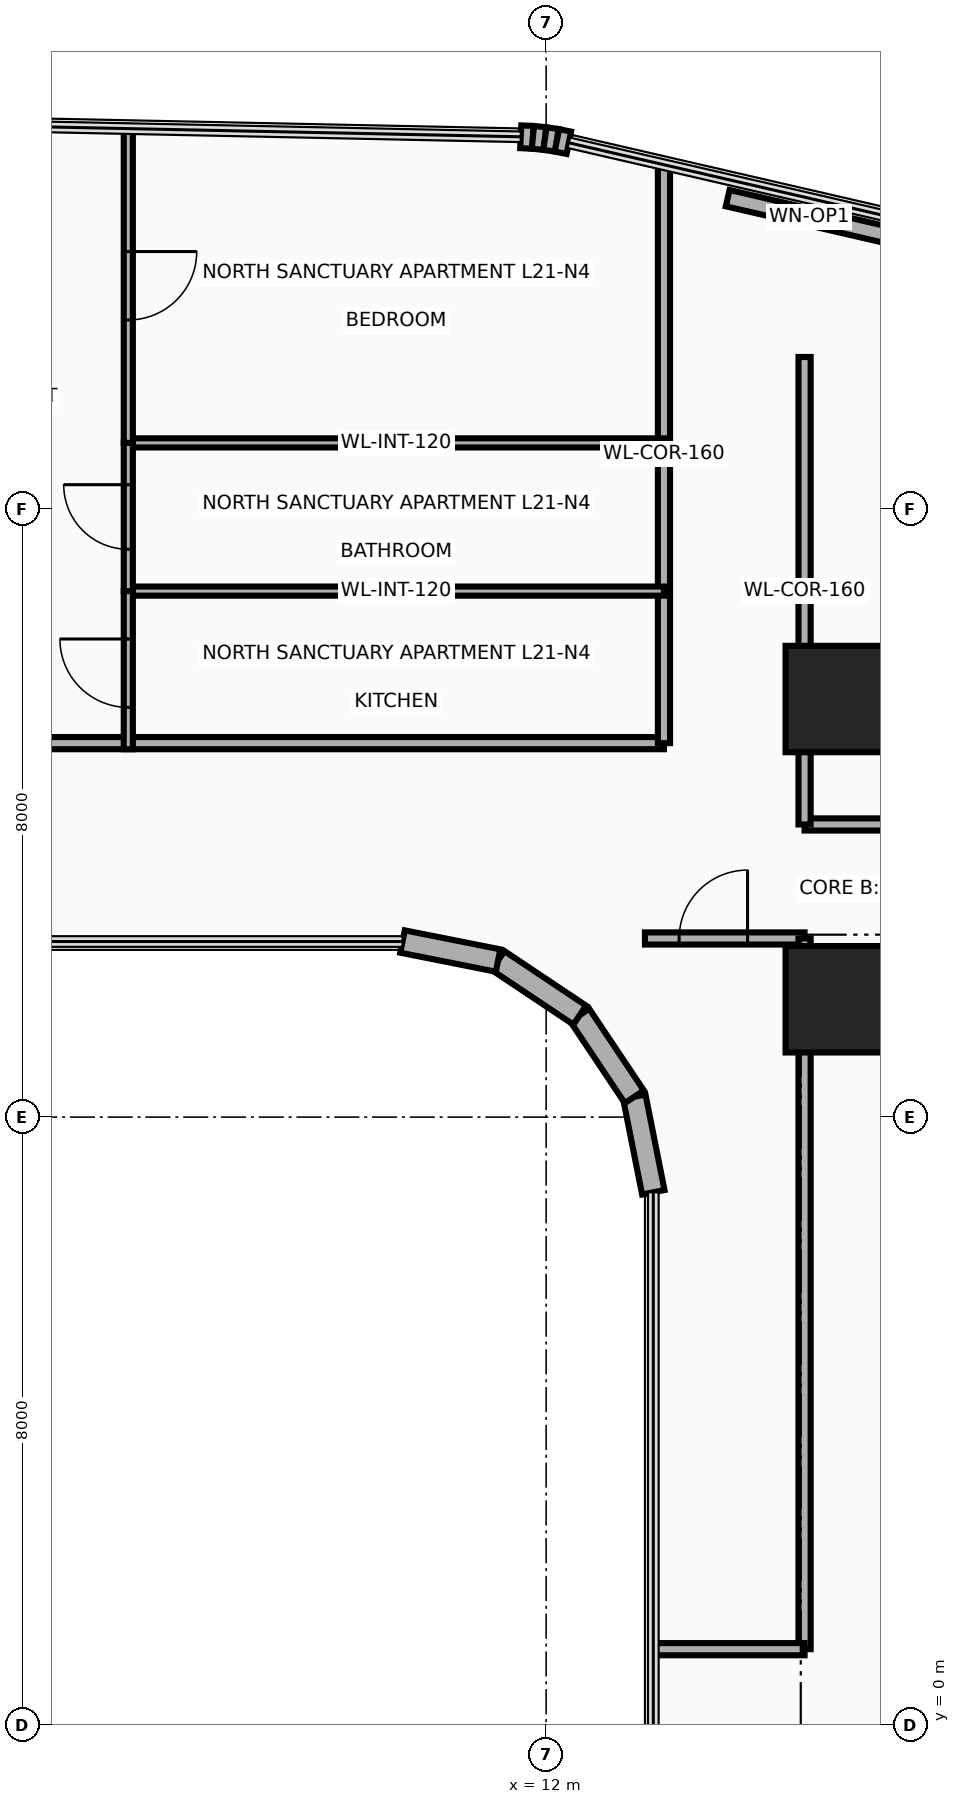
"""IFC4 building model, lengths in metres.
Left out: names, types, materials, properties, quantities, classifications, styles, units other than length and angle.
Written with IfcOpenShell. Run it as: python <this file> out.ifc"""

import sys

from ifc_helpers import new_model, si_unit, direction, frame, frame_2d, origin, origin_2d, place, context, subcontext, project, spatial, rectangle, extrude, source, transform, mapped, element, fill, save


model = new_model("IFC4")
c1 = context("Model", 3, precision=1e-05, world=origin(), true_north=direction((0.0, 1.0)))
c2 = subcontext(c1, "Body", "Model", "MODEL_VIEW")
j1 = project(units=[si_unit("LENGTHUNIT", "METRE"), si_unit("PLANEANGLEUNIT", "RADIAN")], contexts=[c1])
p1 = place(None, origin())
s1 = spatial("IfcSite", under=j1, at=p1, CompositionType="ELEMENT")
p2 = place(p1, origin())
s2 = spatial("IfcBuilding", under=s1, at=p2, CompositionType="ELEMENT")
p3 = place(p2, frame((0.0, 0.0, 85.2)))
s3 = spatial("IfcBuildingStorey", under=s2, at=p3, CompositionType="ELEMENT", Elevation=85.2)
p4 = place(p3, frame((15.85, 9.55, 0.0), z_axis=(0.0, 0.0, 1.0), x_axis=(1.0, 0.0, 0.0)))
e1 = element("IfcWall", 1, at=p4, inside=s3, PredefinedType="SHEAR", context=c2, shape_type="SweptSolid", body=[
    extrude(rectangle(XDim=9.0, YDim=0.7, at=frame_2d((4.5, 0.0))), origin(), (0.0, 0.0, 1.0), 3.46),
])
m1 = source(origin(), c2, "Body", "SweptSolid", [
    extrude(rectangle(XDim=1.4, YDim=1.4, at=origin_2d()), origin(), (0.0, 0.0, 1.0), 3.7),
])
for number, where, z_axis, x_axis in (
    (2, (15.85, 9.55, 0.0), (0.0, 0.0, 1.0), (1.0, 0.0, 0.0)),
    (3, (15.85, 13.5, 0.0), (0.0, 0.0, 1.0), (1.0, 0.0, 0.0)),
):
    element("IfcColumn", number, at=place(p3, frame(where, z_axis=z_axis, x_axis=x_axis)), inside=s3, PredefinedType="COLUMN", context=c2, shape_type="MappedRepresentation", body=[
        mapped(m1, transform((0.0, 0.0, 0.0), x_axis=(1.0, 0.0, 0.0), y_axis=(0.0, 1.0, 0.0), z_axis=(0.0, 0.0, 1.0), scale=1.0)),
    ])
p5 = place(p3, frame((11.666, 20.897, 0.0), z_axis=(0.0, 0.0, 1.0), x_axis=(0.998885297239, -0.047203421059, 0.0)))
e4 = element("IfcWall", 4, at=p5, inside=s3, PredefinedType="SOLIDWALL", context=c2, shape_type="SweptSolid", body=[
    extrude(rectangle(XDim=0.16, YDim=0.3, at=frame_2d((0.08, 0.0))), origin(), (0.0, 0.0, 1.0), 3.46),
])
p6 = place(p3, frame((11.826, 20.889, 0.0), z_axis=(0.0, 0.0, 1.0), x_axis=(0.995172891136, -0.098137234257, 0.0)))
e5 = element("IfcWall", 5, at=p6, inside=s3, PredefinedType="SOLIDWALL", context=c2, shape_type="SweptSolid", body=[
    extrude(rectangle(XDim=0.159, YDim=0.3, at=frame_2d((0.08, 0.0))), origin(), (0.0, 0.0, 1.0), 3.46),
])
p7 = place(p3, frame((11.984, 20.874, 0.0), z_axis=(0.0, 0.0, 1.0), x_axis=(0.988846069207, -0.148941100486, 0.0)))
e6 = element("IfcWall", 6, at=p7, inside=s3, PredefinedType="SOLIDWALL", context=c2, shape_type="SweptSolid", body=[
    extrude(rectangle(XDim=0.159, YDim=0.3, at=frame_2d((0.08, 0.0))), origin(), (0.0, 0.0, 1.0), 3.46),
])
p8 = place(p3, frame((12.142, 20.85, 0.0), z_axis=(0.0, 0.0, 1.0), x_axis=(0.979991950448, -0.19903712482, 0.0)))
e7 = element("IfcWall", 7, at=p8, inside=s3, PredefinedType="SOLIDWALL", context=c2, shape_type="SweptSolid", body=[
    extrude(rectangle(XDim=0.161, YDim=0.3, at=frame_2d((0.08, 0.0))), origin(), (0.0, 0.0, 1.0), 3.46),
])
p9 = place(p3, frame((14.389, 20.09, 0.0), z_axis=(0.0, 0.0, 1.0), x_axis=(0.974400545997, -0.224818984875, 0.0)))
e8 = element("IfcWall", 8, at=p9, inside=s3, PredefinedType="SOLIDWALL", context=c2, shape_type="SweptSolid", body=[
    extrude(rectangle(XDim=2.2, YDim=0.22, at=frame_2d((1.1, 0.0))), origin(), (0.0, 0.0, 1.0), 3.46),
])
p10 = place(p9, frame((0.65, 0.0, 0.95)))
e9 = element("IfcOpeningElement", 9, at=p10, cuts=e8, PredefinedType="OPENING", context=c2, shape_type="SweptSolid", body=[
    extrude(rectangle(XDim=0.9, YDim=1.3, at=frame_2d((0.45, 0.65))), frame((0.0, 0.125, 0.0), z_axis=(0.0, -1.0, 0.0), x_axis=(1.0, 0.0, 0.0)), (0.0, 0.0, 1.0), 0.25),
])
p11 = place(p3, frame((13.41, 7.011, 0.0), z_axis=(0.0, 0.0, 1.0), x_axis=(-0.195090163074, 0.980785312019, 0.0)))
e10 = element("IfcWall", 10, at=p11, inside=s3, PredefinedType="SOLIDWALL", context=c2, shape_type="SweptSolid", body=[
    extrude(rectangle(XDim=1.281, YDim=0.3, at=frame_2d((0.641, 0.0))), origin(), (0.0, 0.0, 1.0), 3.46),
])
for number, where, z_axis, x_axis in (
    (11, (13.16, 8.268, 0.0), (0.0, 0.0, 1.0), (-0.556, 0.831, 0.0)),
    (12, (12.442, 9.342, 0.0), (0.0, 0.0, 1.0), (-0.831, 0.556, 0.0)),
):
    element("IfcWall", number, at=place(p3, frame(where, z_axis=z_axis, x_axis=x_axis)), inside=s3, PredefinedType="SOLIDWALL", context=c2, shape_type="SweptSolid", body=[
        extrude(rectangle(XDim=1.292, YDim=0.3, at=frame_2d((0.646, 0.0))), origin(), (0.0, 0.0, 1.0), 3.46),
    ])
p12 = place(p3, frame((11.367, 10.06, 0.0), z_axis=(0.0, 0.0, 1.0), x_axis=(-0.980778058848, 0.195126623715, 0.0)))
e13 = element("IfcWall", 13, at=p12, inside=s3, PredefinedType="SOLIDWALL", context=c2, shape_type="SweptSolid", body=[
    extrude(rectangle(XDim=1.281, YDim=0.3, at=frame_2d((0.641, 0.0))), origin(), (0.0, 0.0, 1.0), 3.46),
])
p13 = place(p3, frame((-33.54, 12.92, 0.0), z_axis=(0.0, 0.0, 1.0), x_axis=(1.0, 0.0, 0.0)))
e14 = element("IfcWall", 14, at=p13, inside=s3, PredefinedType="PARTITIONING", context=c2, shape_type="SweptSolid", body=[
    extrude(rectangle(XDim=47.09, YDim=0.16, at=frame_2d((23.545, 0.0))), origin(), (0.0, 0.0, 1.0), 2.583),
])
p14 = place(p13, frame((4.48, 0.0, 0.0)))
e15 = element("IfcOpeningElement", 15, at=p14, cuts=e14, PredefinedType="OPENING", context=c2, shape_type="SweptSolid", body=[
    extrude(rectangle(XDim=1.8, YDim=2.15, at=frame_2d((0.9, 1.075))), frame((0.0, 0.095, 0.0), z_axis=(0.0, -1.0, 0.0), x_axis=(1.0, 0.0, 0.0)), (0.0, 0.0, 1.0), 0.19),
])
p15 = place(p13, frame((15.355, 0.0, 0.0)))
e16 = element("IfcOpeningElement", 16, at=p15, cuts=e14, PredefinedType="OPENING", context=c2, shape_type="SweptSolid", body=[
    extrude(rectangle(XDim=0.9, YDim=2.1, at=frame_2d((0.45, 1.05))), frame((0.0, 0.095, 0.0), z_axis=(0.0, -1.0, 0.0), x_axis=(1.0, 0.0, 0.0)), (0.0, 0.0, 1.0), 0.19),
])
p16 = place(p13, frame((23.632, 0.0, 0.0)))
e17 = element("IfcOpeningElement", 17, at=p16, cuts=e14, PredefinedType="OPENING", context=c2, shape_type="SweptSolid", body=[
    extrude(rectangle(XDim=0.95, YDim=2.15, at=frame_2d((0.475, 1.075))), frame((0.0, 0.095, 0.0), z_axis=(0.0, -1.0, 0.0), x_axis=(1.0, 0.0, 0.0)), (0.0, 0.0, 1.0), 0.19),
])
p17 = place(p13, frame((36.28, 0.0, 0.0)))
e18 = element("IfcOpeningElement", 18, at=p17, cuts=e14, PredefinedType="OPENING", context=c2, shape_type="SweptSolid", body=[
    extrude(rectangle(XDim=0.95, YDim=2.15, at=frame_2d((0.475, 1.075))), frame((0.0, 0.095, 0.0), z_axis=(0.0, -1.0, 0.0), x_axis=(1.0, 0.0, 0.0)), (0.0, 0.0, 1.0), 0.19),
])
p18 = place(p3, frame((13.55, 12.92, 0.0), z_axis=(0.0, 0.0, 1.0), x_axis=(0.0, 1.0, 0.0)))
e19 = element("IfcWall", 19, at=p18, inside=s3, PredefinedType="PARTITIONING", context=c2, shape_type="SweptSolid", body=[
    extrude(rectangle(XDim=7.609, YDim=0.16, at=frame_2d((3.805, 0.0))), origin(), (0.0, 0.0, 1.0), 2.583),
])
for number, where, z_axis, x_axis in (
    (20, (6.503, 14.92, 0.0), (0.0, 0.0, 1.0), (1.0, 0.0, 0.0)),
    (21, (6.503, 16.87, 0.0), (0.0, 0.0, 1.0), (1.0, 0.0, 0.0)),
):
    element("IfcWall", number, at=place(p3, frame(where, z_axis=z_axis, x_axis=x_axis)), inside=s3, PredefinedType="PARTITIONING", context=c2, shape_type="SweptSolid", body=[
        extrude(rectangle(XDim=7.047, YDim=0.12, at=frame_2d((3.523, 0.0))), origin(), (0.0, 0.0, 1.0), 3.46),
    ])
p19 = place(p3, frame((6.503, 14.92, 0.0), z_axis=(0.0, 0.0, 1.0), x_axis=(0.0, 1.0, 0.0)))
e22 = element("IfcWall", 22, at=p19, inside=s3, PredefinedType="PARTITIONING", context=c2, shape_type="SweptSolid", body=[
    extrude(rectangle(XDim=1.95, YDim=0.12, at=frame_2d((0.975, 0.0))), origin(), (0.0, 0.0, 1.0), 3.46),
])
p20 = place(p19, frame((0.55, 0.0, 0.0)))
e23 = element("IfcOpeningElement", 23, at=p20, cuts=e22, PredefinedType="OPENING", context=c2, shape_type="SweptSolid", body=[
    extrude(rectangle(XDim=0.85, YDim=2.1, at=frame_2d((0.425, 1.05))), frame((0.0, 0.075, 0.0), z_axis=(0.0, -1.0, 0.0), x_axis=(1.0, 0.0, 0.0)), (0.0, 0.0, 1.0), 0.15),
])
p21 = place(p3, frame((6.503, 12.84, 0.0), z_axis=(0.0, 0.0, 1.0), x_axis=(0.0, 1.0, 0.0)))
e24 = element("IfcWall", 24, at=p21, inside=s3, PredefinedType="PARTITIONING", context=c2, shape_type="SweptSolid", body=[
    extrude(rectangle(XDim=2.08, YDim=0.12, at=frame_2d((1.04, 0.0))), origin(), (0.0, 0.0, 1.0), 2.583),
])
p22 = place(p21, frame((0.55, 0.0, 0.0)))
e25 = element("IfcOpeningElement", 25, at=p22, cuts=e24, PredefinedType="OPENING", context=c2, shape_type="SweptSolid", body=[
    extrude(rectangle(XDim=0.9, YDim=2.1, at=frame_2d((0.45, 1.05))), frame((0.0, 0.075, 0.0), z_axis=(0.0, -1.0, 0.0), x_axis=(1.0, 0.0, 0.0)), (0.0, 0.0, 1.0), 0.15),
])
p23 = place(p3, frame((6.503, 16.87, 0.0), z_axis=(0.0, 0.0, 1.0), x_axis=(0.0, 1.0, 0.0)))
e26 = element("IfcWall", 26, at=p23, inside=s3, PredefinedType="PARTITIONING", context=c2, shape_type="SweptSolid", body=[
    extrude(rectangle(XDim=4.134, YDim=0.12, at=frame_2d((2.067, 0.0))), origin(), (0.0, 0.0, 1.0), 3.46),
])
p24 = place(p23, frame((1.617, 0.0, 0.0)))
e27 = element("IfcOpeningElement", 27, at=p24, cuts=e26, PredefinedType="OPENING", context=c2, shape_type="SweptSolid", body=[
    extrude(rectangle(XDim=0.9, YDim=2.1, at=frame_2d((0.45, 1.05))), frame((0.0, 0.075, 0.0), z_axis=(0.0, -1.0, 0.0), x_axis=(1.0, 0.0, 0.0)), (0.0, 0.0, 1.0), 0.15),
])
p25 = place(p3, frame((15.4, 11.85, 0.0), z_axis=(0.0, 0.0, 1.0), x_axis=(1.0, 0.0, 0.0)))
e28 = element("IfcWall", 28, at=p25, inside=s3, PredefinedType="PARTITIONING", context=c2, shape_type="SweptSolid", body=[
    extrude(rectangle(XDim=10.2, YDim=0.16, at=frame_2d((5.1, 0.0))), origin(), (0.0, 0.0, 1.0), 2.834),
])
p26 = place(p25, frame((4.65, 0.0, 0.0)))
e29 = element("IfcOpeningElement", 29, at=p26, cuts=e28, PredefinedType="OPENING", context=c2, shape_type="SweptSolid", body=[
    extrude(rectangle(XDim=0.9, YDim=2.1, at=frame_2d((0.45, 1.05))), frame((0.0, 0.095, 0.0), z_axis=(0.0, -1.0, 0.0), x_axis=(1.0, 0.0, 0.0)), (0.0, 0.0, 1.0), 0.19),
])
p27 = place(p3, frame((15.4, 11.85, 0.0), z_axis=(0.0, 0.0, 1.0), x_axis=(0.0, 1.0, 0.0)))
e30 = element("IfcWall", 30, at=p27, inside=s3, PredefinedType="PARTITIONING", context=c2, shape_type="SweptSolid", body=[
    extrude(rectangle(XDim=6.15, YDim=0.16, at=frame_2d((3.075, 0.0))), origin(), (0.0, 0.0, 1.0), 2.583),
])
p28 = place(p3, frame((13.3, 10.35, 0.0), z_axis=(0.0, 0.0, 1.0), x_axis=(1.0, 0.0, 0.0)))
e31 = element("IfcWall", 31, at=p28, inside=s3, PredefinedType="PARTITIONING", context=c2, shape_type="SweptSolid", body=[
    extrude(rectangle(XDim=2.1, YDim=0.16, at=frame_2d((1.05, 0.0))), origin(), (0.0, 0.0, 1.0), 2.583),
])
p29 = place(p28, frame((0.45, 0.0, 0.0)))
e32 = element("IfcOpeningElement", 32, at=p29, cuts=e31, PredefinedType="OPENING", context=c2, shape_type="SweptSolid", body=[
    extrude(rectangle(XDim=0.9, YDim=2.1, at=frame_2d((0.45, 1.05))), frame((0.0, 0.095, 0.0), z_axis=(0.0, -1.0, 0.0), x_axis=(1.0, 0.0, 0.0)), (0.0, 0.0, 1.0), 0.19),
])
p30 = place(p3, frame((15.4, 1.0, 0.0), z_axis=(0.0, 0.0, 1.0), x_axis=(0.0, 1.0, 0.0)))
e33 = element("IfcWall", 33, at=p30, inside=s3, PredefinedType="PARTITIONING", context=c2, shape_type="SweptSolid", body=[
    extrude(rectangle(XDim=9.35, YDim=0.16, at=frame_2d((4.675, 0.0))), origin(), (0.0, 0.0, 1.0), 2.245),
])
p31 = place(p3, frame((13.41, 1.0, 0.0), z_axis=(0.0, 0.0, 1.0), x_axis=(1.0, 0.0, 0.0)))
e34 = element("IfcWall", 34, at=p31, inside=s3, PredefinedType="PARTITIONING", context=c2, shape_type="SweptSolid", body=[
    extrude(rectangle(XDim=1.99, YDim=0.16, at=frame_2d((0.995, 0.0))), origin(), (0.0, 0.0, 1.0), 2.245),
])
p32 = place(p10, origin())
e35 = element("IfcWindow", 35, at=p32, inside=s3, PartitioningType="SINGLE_PANEL", PredefinedType="WINDOW", context=c2, shape_type="SweptSolid", body=[
    extrude(rectangle(XDim=0.9, YDim=1.3, at=frame_2d((0.45, 0.65))), frame((0.0, 0.03, 0.0), z_axis=(0.0, -1.0, 0.0), x_axis=(1.0, 0.0, 0.0)), (0.0, 0.0, 1.0), 0.06),
])
fill(e9, e35)
p33 = place(p20, origin())
e36 = element("IfcDoor", 36, at=p33, inside=s3, OperationType="SINGLE_SWING_LEFT", PredefinedType="DOOR", context=c2, shape_type="SweptSolid", body=[
    extrude(rectangle(XDim=0.85, YDim=2.1, at=frame_2d((0.425, 1.05))), frame((0.0, 0.025, 0.0), z_axis=(0.0, -1.0, 0.0), x_axis=(1.0, 0.0, 0.0)), (0.0, 0.0, 1.0), 0.05),
])
fill(e23, e36)
p34 = place(p22, origin())
e37 = element("IfcDoor", 37, at=p34, inside=s3, OperationType="SINGLE_SWING_RIGHT", PredefinedType="DOOR", context=c2, shape_type="SweptSolid", body=[
    extrude(rectangle(XDim=0.9, YDim=2.1, at=frame_2d((0.45, 1.05))), frame((0.0, 0.025, 0.0), z_axis=(0.0, -1.0, 0.0), x_axis=(1.0, 0.0, 0.0)), (0.0, 0.0, 1.0), 0.05),
])
fill(e25, e37)
p35 = place(p24, frame((0.9, 0.0, 0.0), z_axis=(0.0, 0.0, 1.0), x_axis=(-1.0, 0.0, 0.0)))
e38 = element("IfcDoor", 38, at=p35, inside=s3, OperationType="SINGLE_SWING_LEFT", PredefinedType="DOOR", context=c2, shape_type="SweptSolid", body=[
    extrude(rectangle(XDim=0.9, YDim=2.1, at=frame_2d((0.45, 1.05))), frame((0.0, 0.025, 0.0), z_axis=(0.0, -1.0, 0.0), x_axis=(1.0, 0.0, 0.0)), (0.0, 0.0, 1.0), 0.05),
])
fill(e27, e38)
p36 = place(p29, origin())
e39 = element("IfcDoor", 39, at=p36, inside=s3, OperationType="SINGLE_SWING_LEFT", PredefinedType="DOOR", context=c2, shape_type="SweptSolid", body=[
    extrude(rectangle(XDim=0.9, YDim=2.1, at=frame_2d((0.45, 1.05))), frame((0.0, 0.025, 0.0), z_axis=(0.0, -1.0, 0.0), x_axis=(1.0, 0.0, 0.0)), (0.0, 0.0, 1.0), 0.05),
])
fill(e32, e39)
save(model, sys.argv[1])
